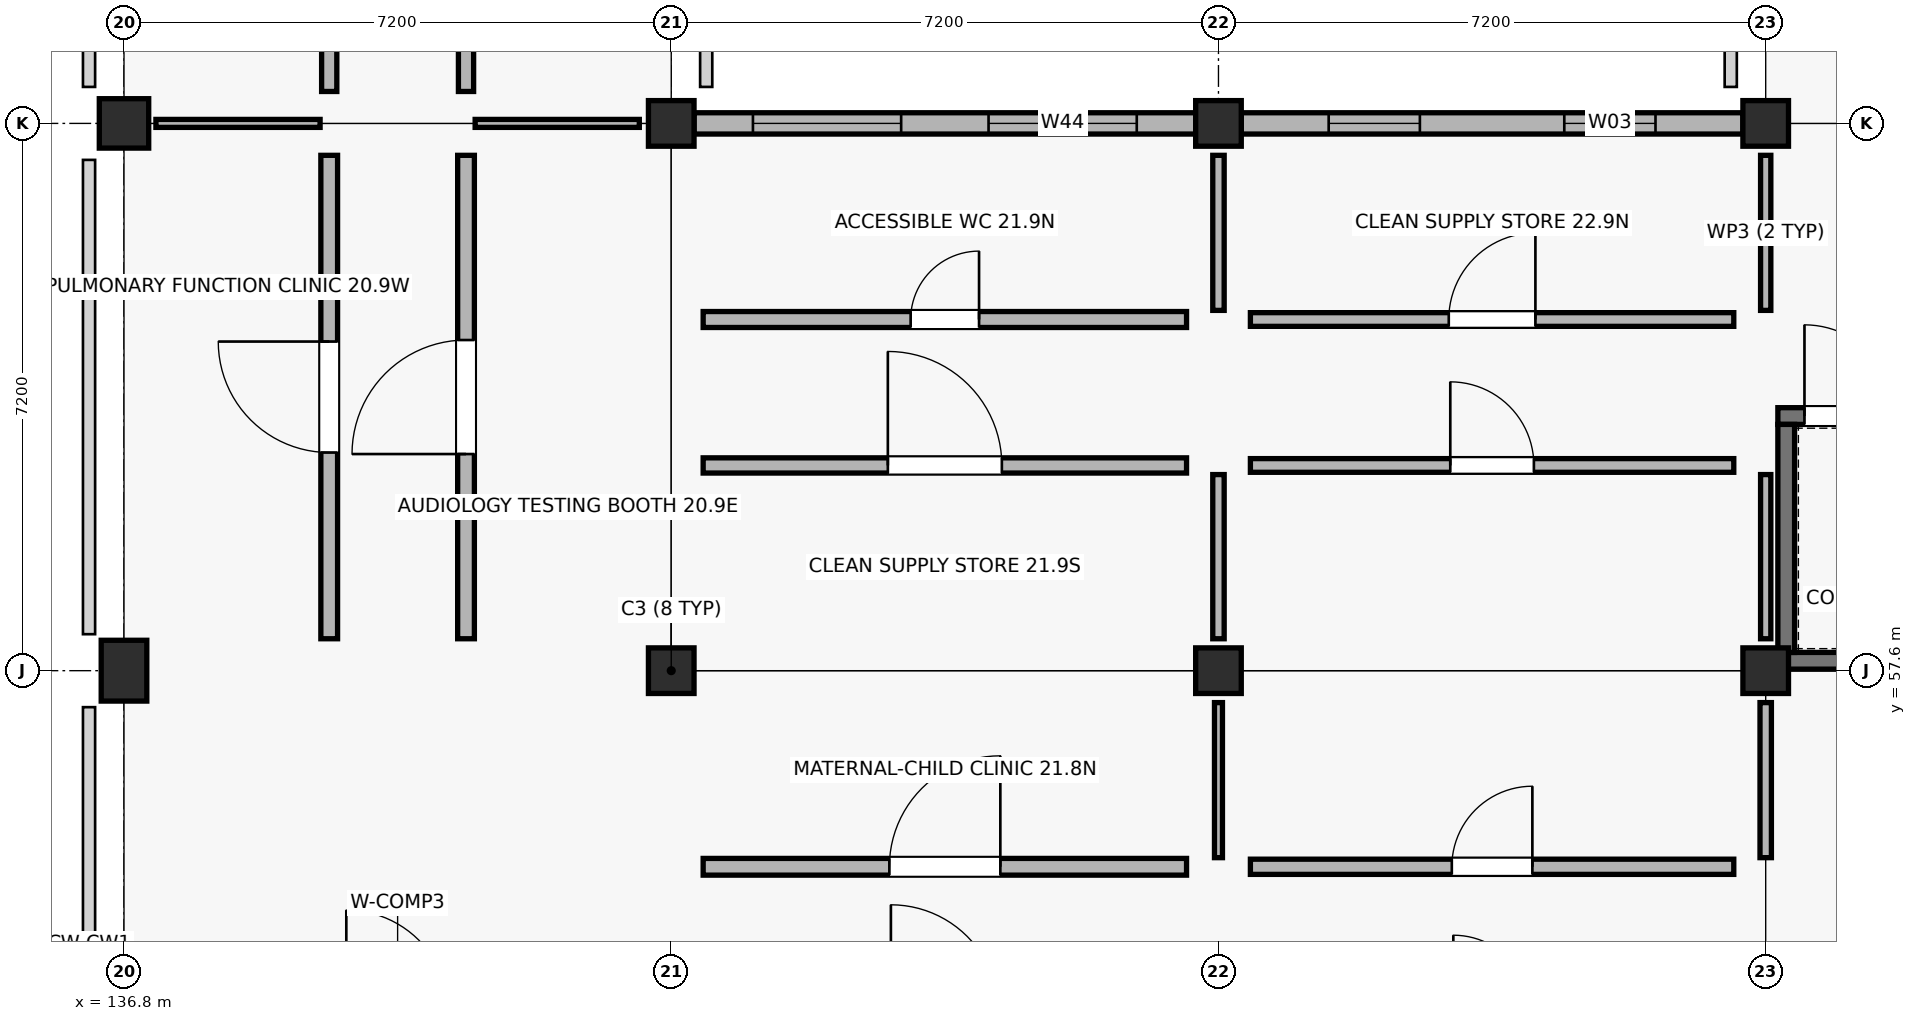
"""IFC4 building model, lengths in metres.
Left out: names, types, materials, properties, quantities, classifications, styles, units other than length and angle.
Written with IfcOpenShell. Run it as: python <this file> out.ifc"""

import sys

from ifc_helpers import new_model, si_unit, direction, frame, frame_2d, origin, origin_2d, place, context, subcontext, project, spatial, rectangle, circle, extrude, element, fill, save


model = new_model("IFC4")
c1 = context("Model", 3, precision=1e-05, world=origin(), true_north=direction((0.0, 1.0)))
c2 = subcontext(c1, "Body", "Model", "MODEL_VIEW")
j1 = project(units=[si_unit("LENGTHUNIT", "METRE"), si_unit("PLANEANGLEUNIT", "RADIAN")], contexts=[c1])
p1 = place(None, origin())
s1 = spatial("IfcSite", under=j1, at=p1, CompositionType="ELEMENT")
p2 = place(p1, origin())
s2 = spatial("IfcBuilding", under=s1, at=p2, CompositionType="ELEMENT")
p3 = place(p2, frame((0.0, 0.0, 4.5)))
s3 = spatial("IfcBuildingStorey", under=s2, at=p3, CompositionType="ELEMENT", Elevation=4.5)
p4 = place(p3, frame((136.8, 57.6, 0.0), z_axis=(0.0, 0.0, 1.0), x_axis=(1.0, 0.0, 0.0)))
e1 = element("IfcColumn", 1, at=p4, inside=s3, PredefinedType="PILASTER", context=c2, shape_type="SweptSolid", body=[
    extrude(rectangle(XDim=0.6, YDim=0.8, at=origin_2d()), origin(), (0.0, 0.0, 1.0), 4.5),
])
p5 = place(p3, frame((136.8, 64.8, 0.0), z_axis=(0.0, 0.0, 1.0), x_axis=(1.0, 0.0, 0.0)))
e2 = element("IfcColumn", 2, at=p5, inside=s3, PredefinedType="COLUMN", context=c2, shape_type="SweptSolid", body=[
    extrude(circle(Radius=0.325, at=origin_2d()), origin(), (0.0, 0.0, 1.0), 4.5),
])
for number, where, z_axis, x_axis in (
    (3, (144.0, 57.6, 0.0), (0.0, 0.0, 1.0), (1.0, 0.0, 0.0)),
    (4, (144.0, 64.8, 0.0), (0.0, 0.0, 1.0), (1.0, 0.0, 0.0)),
    (5, (151.2, 57.6, 0.0), (0.0, 0.0, 1.0), (1.0, 0.0, 0.0)),
    (6, (151.2, 64.8, 0.0), (0.0, 0.0, 1.0), (1.0, 0.0, 0.0)),
    (7, (158.4, 57.6, 0.0), (0.0, 0.0, 1.0), (1.0, 0.0, 0.0)),
    (8, (158.4, 64.8, 0.0), (0.0, 0.0, 1.0), (1.0, 0.0, 0.0)),
):
    element("IfcColumn", number, at=place(p3, frame(where, z_axis=z_axis, x_axis=x_axis)), inside=s3, PredefinedType="COLUMN", context=c2, shape_type="SweptSolid", body=[
        extrude(rectangle(XDim=0.6, YDim=0.6, at=origin_2d()), origin(), (0.0, 0.0, 1.0), 4.5),
    ])
p6 = place(p3, frame((150.9, 64.8, 0.0), z_axis=(0.0, 0.0, 1.0), x_axis=(-1.0, 0.0, 0.0)))
e9 = element("IfcWall", 9, at=p6, inside=s3, PredefinedType="STANDARD", context=c2, shape_type="SweptSolid", body=[
    extrude(rectangle(XDim=6.6, YDim=0.28, at=frame_2d((3.3, 0.0))), origin(), (0.0, 0.0, 1.0), 3.47),
])
p7 = place(p6, frame((0.775, 0.0, 0.9)))
e10 = element("IfcOpeningElement", 10, at=p7, cuts=e9, PredefinedType="OPENING", context=c2, shape_type="SweptSolid", body=[
    extrude(rectangle(XDim=1.95, YDim=1.75, at=frame_2d((0.975, 0.875))), frame((0.0, 0.15, 0.0), z_axis=(0.0, -1.0, 0.0), x_axis=(1.0, 0.0, 0.0)), (0.0, 0.0, 1.0), 0.3),
])
p8 = place(p6, frame((3.875, 0.0, 0.9)))
e11 = element("IfcOpeningElement", 11, at=p8, cuts=e9, PredefinedType="OPENING", context=c2, shape_type="SweptSolid", body=[
    extrude(rectangle(XDim=1.95, YDim=1.75, at=frame_2d((0.975, 0.875))), frame((0.0, 0.15, 0.0), z_axis=(0.0, -1.0, 0.0), x_axis=(1.0, 0.0, 0.0)), (0.0, 0.0, 1.0), 0.3),
])
p9 = place(p3, frame((158.1, 64.8, 0.0), z_axis=(0.0, 0.0, 1.0), x_axis=(-1.0, 0.0, 0.0)))
e12 = element("IfcWall", 12, at=p9, inside=s3, PredefinedType="STANDARD", context=c2, shape_type="SweptSolid", body=[
    extrude(rectangle(XDim=6.6, YDim=0.28, at=frame_2d((3.3, 0.0))), origin(), (0.0, 0.0, 1.0), 3.47),
])
p10 = place(p9, frame((1.15, 0.0, 0.9)))
e13 = element("IfcOpeningElement", 13, at=p10, cuts=e12, PredefinedType="OPENING", context=c2, shape_type="SweptSolid", body=[
    extrude(rectangle(XDim=1.2, YDim=1.25, at=frame_2d((0.6, 0.625))), frame((0.0, 0.15, 0.0), z_axis=(0.0, -1.0, 0.0), x_axis=(1.0, 0.0, 0.0)), (0.0, 0.0, 1.0), 0.3),
])
p11 = place(p9, frame((4.25, 0.0, 0.9)))
e14 = element("IfcOpeningElement", 14, at=p11, cuts=e12, PredefinedType="OPENING", context=c2, shape_type="SweptSolid", body=[
    extrude(rectangle(XDim=1.2, YDim=1.25, at=frame_2d((0.6, 0.625))), frame((0.0, 0.15, 0.0), z_axis=(0.0, -1.0, 0.0), x_axis=(1.0, 0.0, 0.0)), (0.0, 0.0, 1.0), 0.3),
])
p12 = place(p3, frame((158.56, 57.73, 0.0), z_axis=(0.0, 0.0, 1.0), x_axis=(1.0, 0.0, 0.0)))
e15 = element("IfcWall", 15, at=p12, inside=s3, PredefinedType="SHEAR", context=c2, shape_type="SweptSolid", body=[
    extrude(rectangle(XDim=6.88, YDim=0.22, at=frame_2d((3.44, 0.0))), origin(), (0.0, 0.0, 1.0), 4.22),
])
p13 = place(p3, frame((158.56, 60.95, 0.0), z_axis=(0.0, 0.0, 1.0), x_axis=(1.0, 0.0, 0.0)))
e16 = element("IfcWall", 16, at=p13, inside=s3, PredefinedType="SHEAR", context=c2, shape_type="SweptSolid", body=[
    extrude(rectangle(XDim=6.88, YDim=0.22, at=frame_2d((3.44, 0.0))), origin(), (0.0, 0.0, 1.0), 4.22),
])
p14 = place(p13, frame((0.35, 0.0, 0.0)))
e17 = element("IfcOpeningElement", 17, at=p14, cuts=e16, PredefinedType="OPENING", context=c2, shape_type="SweptSolid", body=[
    extrude(rectangle(XDim=1.2, YDim=2.15, at=frame_2d((0.6, 1.075))), frame((0.0, 0.12, 0.0), z_axis=(0.0, -1.0, 0.0), x_axis=(1.0, 0.0, 0.0)), (0.0, 0.0, 1.0), 0.24),
])
p15 = place(p3, frame((158.67, 57.84, 0.0), z_axis=(0.0, 0.0, 1.0), x_axis=(0.0, 1.0, 0.0)))
e18 = element("IfcWall", 18, at=p15, inside=s3, PredefinedType="SHEAR", context=c2, shape_type="SweptSolid", body=[
    extrude(rectangle(XDim=3.0, YDim=0.22, at=frame_2d((1.5, 0.0))), origin(), (0.0, 0.0, 1.0), 4.22),
])
p16 = place(p3, frame((139.5, 58.02, 0.0), z_axis=(0.0, 0.0, 1.0), x_axis=(0.0, 1.0, 0.0)))
e19 = element("IfcWall", 19, at=p16, inside=s3, PredefinedType="SOLIDWALL", context=c2, shape_type="SweptSolid", body=[
    extrude(rectangle(XDim=6.36, YDim=0.22, at=frame_2d((3.18, 0.0))), origin(), (0.0, 0.0, 1.0), 3.36),
])
p17 = place(p16, frame((2.45, 0.0, 0.0)))
e20 = element("IfcOpeningElement", 20, at=p17, cuts=e19, PredefinedType="OPENING", context=c2, shape_type="SweptSolid", body=[
    extrude(rectangle(XDim=1.46, YDim=2.09, at=frame_2d((0.73, 1.045))), frame((0.0, 0.12, 0.0), z_axis=(0.0, -1.0, 0.0), x_axis=(1.0, 0.0, 0.0)), (0.0, 0.0, 1.0), 0.24),
])
p18 = place(p3, frame((137.22, 64.8, 0.0), z_axis=(0.0, 0.0, 1.0), x_axis=(1.0, 0.0, 0.0)))
e21 = element("IfcWall", 21, at=p18, inside=s3, PredefinedType="PARTITIONING", context=c2, shape_type="SweptSolid", body=[
    extrude(rectangle(XDim=2.16, YDim=0.105, at=frame_2d((1.08, 0.0))), origin(), (0.0, 0.0, 1.0), 3.36),
])
p19 = place(p3, frame((141.3, 58.02, 0.0), z_axis=(0.0, 0.0, 1.0), x_axis=(0.0, 1.0, 0.0)))
e22 = element("IfcWall", 22, at=p19, inside=s3, PredefinedType="SOLIDWALL", context=c2, shape_type="SweptSolid", body=[
    extrude(rectangle(XDim=6.36, YDim=0.22, at=frame_2d((3.18, 0.0))), origin(), (0.0, 0.0, 1.0), 3.36),
])
p20 = place(p19, frame((2.43, 0.0, 0.0)))
e23 = element("IfcOpeningElement", 23, at=p20, cuts=e22, PredefinedType="OPENING", context=c2, shape_type="SweptSolid", body=[
    extrude(rectangle(XDim=1.5, YDim=2.09, at=frame_2d((0.75, 1.045))), frame((0.0, 0.12, 0.0), z_axis=(0.0, -1.0, 0.0), x_axis=(1.0, 0.0, 0.0)), (0.0, 0.0, 1.0), 0.24),
])
p21 = place(p3, frame((141.42, 64.8, 0.0), z_axis=(0.0, 0.0, 1.0), x_axis=(1.0, 0.0, 0.0)))
e24 = element("IfcWall", 24, at=p21, inside=s3, PredefinedType="PARTITIONING", context=c2, shape_type="SweptSolid", body=[
    extrude(rectangle(XDim=2.16, YDim=0.105, at=frame_2d((1.08, 0.0))), origin(), (0.0, 0.0, 1.0), 3.36),
])
p22 = place(p3, frame((139.5, 65.22, 0.0), z_axis=(0.0, 0.0, 1.0), x_axis=(0.0, 1.0, 0.0)))
e25 = element("IfcWall", 25, at=p22, inside=s3, PredefinedType="SOLIDWALL", context=c2, shape_type="SweptSolid", body=[
    extrude(rectangle(XDim=6.36, YDim=0.2, at=frame_2d((3.18, 0.0))), origin(), (0.0, 0.0, 1.0), 3.36),
])
p23 = place(p22, frame((2.73, 0.0, 0.0)))
e26 = element("IfcOpeningElement", 26, at=p23, cuts=e25, PredefinedType="OPENING", context=c2, shape_type="SweptSolid", body=[
    extrude(rectangle(XDim=0.9, YDim=2.14, at=frame_2d((0.45, 1.07))), frame((0.0, 0.11, 0.0), z_axis=(0.0, -1.0, 0.0), x_axis=(1.0, 0.0, 0.0)), (0.0, 0.0, 1.0), 0.22),
])
p24 = place(p3, frame((141.3, 65.22, 0.0), z_axis=(0.0, 0.0, 1.0), x_axis=(0.0, 1.0, 0.0)))
e27 = element("IfcWall", 27, at=p24, inside=s3, PredefinedType="SOLIDWALL", context=c2, shape_type="SweptSolid", body=[
    extrude(rectangle(XDim=6.36, YDim=0.2, at=frame_2d((3.18, 0.0))), origin(), (0.0, 0.0, 1.0), 3.36),
])
p25 = place(p24, frame((2.71, 0.0, 0.0)))
e28 = element("IfcOpeningElement", 28, at=p25, cuts=e27, PredefinedType="OPENING", context=c2, shape_type="SweptSolid", body=[
    extrude(rectangle(XDim=0.94, YDim=2.14, at=frame_2d((0.47, 1.07))), frame((0.0, 0.11, 0.0), z_axis=(0.0, -1.0, 0.0), x_axis=(1.0, 0.0, 0.0)), (0.0, 0.0, 1.0), 0.22),
])
p26 = place(p3, frame((144.42, 55.02, 0.0), z_axis=(0.0, 0.0, 1.0), x_axis=(1.0, 0.0, 0.0)))
e29 = element("IfcWall", 29, at=p26, inside=s3, PredefinedType="SOLIDWALL", context=c2, shape_type="SweptSolid", body=[
    extrude(rectangle(XDim=6.36, YDim=0.22, at=frame_2d((3.18, 0.0))), origin(), (0.0, 0.0, 1.0), 3.36),
])
p27 = place(p26, frame((2.45, 0.0, 0.0)))
e30 = element("IfcOpeningElement", 30, at=p27, cuts=e29, PredefinedType="OPENING", context=c2, shape_type="SweptSolid", body=[
    extrude(rectangle(XDim=1.46, YDim=2.14, at=frame_2d((0.73, 1.07))), frame((0.0, 0.12, 0.0), z_axis=(0.0, -1.0, 0.0), x_axis=(1.0, 0.0, 0.0)), (0.0, 0.0, 1.0), 0.24),
])
p28 = place(p3, frame((151.2, 55.14, 0.0), z_axis=(0.0, 0.0, 1.0), x_axis=(0.0, 1.0, 0.0)))
e31 = element("IfcWall", 31, at=p28, inside=s3, PredefinedType="PARTITIONING", context=c2, shape_type="SweptSolid", body=[
    extrude(rectangle(XDim=2.04, YDim=0.105, at=frame_2d((1.02, 0.0))), origin(), (0.0, 0.0, 1.0), 3.36),
])
p29 = place(p3, frame((144.42, 60.3, 0.0), z_axis=(0.0, 0.0, 1.0), x_axis=(1.0, 0.0, 0.0)))
e32 = element("IfcWall", 32, at=p29, inside=s3, PredefinedType="SOLIDWALL", context=c2, shape_type="SweptSolid", body=[
    extrude(rectangle(XDim=6.36, YDim=0.2, at=frame_2d((3.18, 0.0))), origin(), (0.0, 0.0, 1.0), 3.36),
])
p30 = place(p29, frame((2.43, 0.0, 0.0)))
e33 = element("IfcOpeningElement", 33, at=p30, cuts=e32, PredefinedType="OPENING", context=c2, shape_type="SweptSolid", body=[
    extrude(rectangle(XDim=1.5, YDim=2.14, at=frame_2d((0.75, 1.07))), frame((0.0, 0.11, 0.0), z_axis=(0.0, -1.0, 0.0), x_axis=(1.0, 0.0, 0.0)), (0.0, 0.0, 1.0), 0.22),
])
p31 = place(p3, frame((151.2, 58.02, 0.0), z_axis=(0.0, 0.0, 1.0), x_axis=(0.0, 1.0, 0.0)))
e34 = element("IfcWall", 34, at=p31, inside=s3, PredefinedType="PARTITIONING", context=c2, shape_type="SweptSolid", body=[
    extrude(rectangle(XDim=2.16, YDim=0.15, at=frame_2d((1.08, 0.0))), origin(), (0.0, 0.0, 1.0), 3.36),
])
p32 = place(p3, frame((144.42, 62.22, 0.0), z_axis=(0.0, 0.0, 1.0), x_axis=(1.0, 0.0, 0.0)))
e35 = element("IfcWall", 35, at=p32, inside=s3, PredefinedType="PLUMBINGWALL", context=c2, shape_type="SweptSolid", body=[
    extrude(rectangle(XDim=6.36, YDim=0.21, at=frame_2d((3.18, 0.0))), origin(), (0.0, 0.0, 1.0), 3.36),
])
p33 = place(p32, frame((2.73, 0.0, 0.0)))
e36 = element("IfcOpeningElement", 36, at=p33, cuts=e35, PredefinedType="OPENING", context=c2, shape_type="SweptSolid", body=[
    extrude(rectangle(XDim=0.9, YDim=2.19, at=frame_2d((0.45, 1.095))), frame((0.0, 0.115, 0.0), z_axis=(0.0, -1.0, 0.0), x_axis=(1.0, 0.0, 0.0)), (0.0, 0.0, 1.0), 0.23),
])
p34 = place(p3, frame((151.2, 62.34, 0.0), z_axis=(0.0, 0.0, 1.0), x_axis=(0.0, 1.0, 0.0)))
e37 = element("IfcWall", 37, at=p34, inside=s3, PredefinedType="PARTITIONING", context=c2, shape_type="SweptSolid", body=[
    extrude(rectangle(XDim=2.04, YDim=0.15, at=frame_2d((1.02, 0.0))), origin(), (0.0, 0.0, 1.0), 3.36),
])
p35 = place(p3, frame((151.62, 55.02, 0.0), z_axis=(0.0, 0.0, 1.0), x_axis=(1.0, 0.0, 0.0)))
e38 = element("IfcWall", 38, at=p35, inside=s3, PredefinedType="SOLIDWALL", context=c2, shape_type="SweptSolid", body=[
    extrude(rectangle(XDim=6.36, YDim=0.2, at=frame_2d((3.18, 0.0))), origin(), (0.0, 0.0, 1.0), 3.36),
])
p36 = place(p35, frame((2.65, 0.0, 0.0)))
e39 = element("IfcOpeningElement", 39, at=p36, cuts=e38, PredefinedType="OPENING", context=c2, shape_type="SweptSolid", body=[
    extrude(rectangle(XDim=1.06, YDim=2.19, at=frame_2d((0.53, 1.095))), frame((0.0, 0.11, 0.0), z_axis=(0.0, -1.0, 0.0), x_axis=(1.0, 0.0, 0.0)), (0.0, 0.0, 1.0), 0.22),
])
p37 = place(p3, frame((158.4, 55.14, 0.0), z_axis=(0.0, 0.0, 1.0), x_axis=(0.0, 1.0, 0.0)))
e40 = element("IfcWall", 40, at=p37, inside=s3, PredefinedType="PARTITIONING", context=c2, shape_type="SweptSolid", body=[
    extrude(rectangle(XDim=2.04, YDim=0.15, at=frame_2d((1.02, 0.0))), origin(), (0.0, 0.0, 1.0), 3.36),
])
p38 = place(p3, frame((151.62, 60.3, 0.0), z_axis=(0.0, 0.0, 1.0), x_axis=(1.0, 0.0, 0.0)))
e41 = element("IfcWall", 41, at=p38, inside=s3, PredefinedType="PARTITIONING", context=c2, shape_type="SweptSolid", body=[
    extrude(rectangle(XDim=6.36, YDim=0.18, at=frame_2d((3.18, 0.0))), origin(), (0.0, 0.0, 1.0), 3.36),
])
p39 = place(p38, frame((2.63, 0.0, 0.0)))
e42 = element("IfcOpeningElement", 42, at=p39, cuts=e41, PredefinedType="OPENING", context=c2, shape_type="SweptSolid", body=[
    extrude(rectangle(XDim=1.1, YDim=2.19, at=frame_2d((0.55, 1.095))), frame((0.0, 0.1, 0.0), z_axis=(0.0, -1.0, 0.0), x_axis=(1.0, 0.0, 0.0)), (0.0, 0.0, 1.0), 0.2),
])
p40 = place(p3, frame((158.4, 58.02, 0.0), z_axis=(0.0, 0.0, 1.0), x_axis=(0.0, 1.0, 0.0)))
e43 = element("IfcWall", 43, at=p40, inside=s3, PredefinedType="PARTITIONING", context=c2, shape_type="SweptSolid", body=[
    extrude(rectangle(XDim=2.16, YDim=0.135, at=frame_2d((1.08, 0.0))), origin(), (0.0, 0.0, 1.0), 3.36),
])
p41 = place(p3, frame((151.62, 62.22, 0.0), z_axis=(0.0, 0.0, 1.0), x_axis=(1.0, 0.0, 0.0)))
e44 = element("IfcWall", 44, at=p41, inside=s3, PredefinedType="PARTITIONING", context=c2, shape_type="SweptSolid", body=[
    extrude(rectangle(XDim=6.36, YDim=0.18, at=frame_2d((3.18, 0.0))), origin(), (0.0, 0.0, 1.0), 3.36),
])
p42 = place(p41, frame((2.61, 0.0, 0.0)))
e45 = element("IfcOpeningElement", 45, at=p42, cuts=e44, PredefinedType="OPENING", context=c2, shape_type="SweptSolid", body=[
    extrude(rectangle(XDim=1.14, YDim=2.19, at=frame_2d((0.57, 1.095))), frame((0.0, 0.1, 0.0), z_axis=(0.0, -1.0, 0.0), x_axis=(1.0, 0.0, 0.0)), (0.0, 0.0, 1.0), 0.2),
])
p43 = place(p3, frame((158.4, 62.34, 0.0), z_axis=(0.0, 0.0, 1.0), x_axis=(0.0, 1.0, 0.0)))
e46 = element("IfcWall", 46, at=p43, inside=s3, PredefinedType="PARTITIONING", context=c2, shape_type="SweptSolid", body=[
    extrude(rectangle(XDim=2.04, YDim=0.135, at=frame_2d((1.02, 0.0))), origin(), (0.0, 0.0, 1.0), 3.36),
])
p44 = place(p7, origin())
e47 = element("IfcWindow", 47, at=p44, inside=s3, PartitioningType="SINGLE_PANEL", PredefinedType="WINDOW", context=c2, shape_type="SweptSolid", body=[
    extrude(rectangle(XDim=1.95, YDim=1.75, at=frame_2d((0.975, 0.875))), frame((0.0, 0.03, 0.0), z_axis=(0.0, -1.0, 0.0), x_axis=(1.0, 0.0, 0.0)), (0.0, 0.0, 1.0), 0.06),
])
fill(e10, e47)
p45 = place(p8, origin())
e48 = element("IfcWindow", 48, at=p45, inside=s3, PartitioningType="SINGLE_PANEL", PredefinedType="WINDOW", context=c2, shape_type="SweptSolid", body=[
    extrude(rectangle(XDim=1.95, YDim=1.75, at=frame_2d((0.975, 0.875))), frame((0.0, 0.03, 0.0), z_axis=(0.0, -1.0, 0.0), x_axis=(1.0, 0.0, 0.0)), (0.0, 0.0, 1.0), 0.06),
])
fill(e11, e48)
p46 = place(p10, origin())
e49 = element("IfcWindow", 49, at=p46, inside=s3, PartitioningType="SINGLE_PANEL", PredefinedType="WINDOW", context=c2, shape_type="SweptSolid", body=[
    extrude(rectangle(XDim=1.2, YDim=1.25, at=frame_2d((0.6, 0.625))), frame((0.0, 0.03, 0.0), z_axis=(0.0, -1.0, 0.0), x_axis=(1.0, 0.0, 0.0)), (0.0, 0.0, 1.0), 0.06),
])
fill(e13, e49)
p47 = place(p11, origin())
e50 = element("IfcWindow", 50, at=p47, inside=s3, PartitioningType="SINGLE_PANEL", PredefinedType="WINDOW", context=c2, shape_type="SweptSolid", body=[
    extrude(rectangle(XDim=1.2, YDim=1.25, at=frame_2d((0.6, 0.625))), frame((0.0, 0.03, 0.0), z_axis=(0.0, -1.0, 0.0), x_axis=(1.0, 0.0, 0.0)), (0.0, 0.0, 1.0), 0.06),
])
fill(e14, e50)
p48 = place(p14, origin())
e51 = element("IfcDoor", 51, at=p48, inside=s3, OperationType="SINGLE_SWING_LEFT", PredefinedType="DOOR", context=c2, shape_type="SweptSolid", body=[
    extrude(rectangle(XDim=1.2, YDim=2.15, at=frame_2d((0.6, 1.075))), frame((0.0, 0.025, 0.0), z_axis=(0.0, -1.0, 0.0), x_axis=(1.0, 0.0, 0.0)), (0.0, 0.0, 1.0), 0.05),
])
fill(e17, e51)
p49 = place(p17, origin())
e52 = element("IfcDoor", 52, at=p49, inside=s3, OperationType="SINGLE_SWING_RIGHT", PredefinedType="DOOR", context=c2, shape_type="SweptSolid", body=[
    extrude(rectangle(XDim=1.46, YDim=2.09, at=frame_2d((0.73, 1.045))), frame((0.0, 0.025, 0.0), z_axis=(0.0, -1.0, 0.0), x_axis=(1.0, 0.0, 0.0)), (0.0, 0.0, 1.0), 0.05),
])
fill(e20, e52)
p50 = place(p20, origin())
e53 = element("IfcDoor", 53, at=p50, inside=s3, OperationType="SINGLE_SWING_LEFT", PredefinedType="DOOR", context=c2, shape_type="SweptSolid", body=[
    extrude(rectangle(XDim=1.5, YDim=2.09, at=frame_2d((0.75, 1.045))), frame((0.0, 0.025, 0.0), z_axis=(0.0, -1.0, 0.0), x_axis=(1.0, 0.0, 0.0)), (0.0, 0.0, 1.0), 0.05),
])
fill(e23, e53)
p51 = place(p27, origin())
e54 = element("IfcDoor", 54, at=p51, inside=s3, OperationType="SINGLE_SWING_RIGHT", PredefinedType="DOOR", context=c2, shape_type="SweptSolid", body=[
    extrude(rectangle(XDim=1.46, YDim=2.14, at=frame_2d((0.73, 1.07))), frame((0.0, 0.025, 0.0), z_axis=(0.0, -1.0, 0.0), x_axis=(1.0, 0.0, 0.0)), (0.0, 0.0, 1.0), 0.05),
])
fill(e30, e54)
p52 = place(p30, origin())
e55 = element("IfcDoor", 55, at=p52, inside=s3, OperationType="SINGLE_SWING_LEFT", PredefinedType="DOOR", context=c2, shape_type="SweptSolid", body=[
    extrude(rectangle(XDim=1.5, YDim=2.14, at=frame_2d((0.75, 1.07))), frame((0.0, 0.025, 0.0), z_axis=(0.0, -1.0, 0.0), x_axis=(1.0, 0.0, 0.0)), (0.0, 0.0, 1.0), 0.05),
])
fill(e33, e55)
p53 = place(p33, origin())
e56 = element("IfcDoor", 56, at=p53, inside=s3, OperationType="SINGLE_SWING_RIGHT", PredefinedType="DOOR", context=c2, shape_type="SweptSolid", body=[
    extrude(rectangle(XDim=0.9, YDim=2.19, at=frame_2d((0.45, 1.095))), frame((0.0, 0.025, 0.0), z_axis=(0.0, -1.0, 0.0), x_axis=(1.0, 0.0, 0.0)), (0.0, 0.0, 1.0), 0.05),
])
fill(e36, e56)
p54 = place(p36, origin())
e57 = element("IfcDoor", 57, at=p54, inside=s3, OperationType="SINGLE_SWING_RIGHT", PredefinedType="DOOR", context=c2, shape_type="SweptSolid", body=[
    extrude(rectangle(XDim=1.06, YDim=2.19, at=frame_2d((0.53, 1.095))), frame((0.0, 0.025, 0.0), z_axis=(0.0, -1.0, 0.0), x_axis=(1.0, 0.0, 0.0)), (0.0, 0.0, 1.0), 0.05),
])
fill(e39, e57)
p55 = place(p39, origin())
e58 = element("IfcDoor", 58, at=p55, inside=s3, OperationType="SINGLE_SWING_LEFT", PredefinedType="DOOR", context=c2, shape_type="SweptSolid", body=[
    extrude(rectangle(XDim=1.1, YDim=2.19, at=frame_2d((0.55, 1.095))), frame((0.0, 0.025, 0.0), z_axis=(0.0, -1.0, 0.0), x_axis=(1.0, 0.0, 0.0)), (0.0, 0.0, 1.0), 0.05),
])
fill(e42, e58)
p56 = place(p42, origin())
e59 = element("IfcDoor", 59, at=p56, inside=s3, OperationType="SINGLE_SWING_RIGHT", PredefinedType="DOOR", context=c2, shape_type="SweptSolid", body=[
    extrude(rectangle(XDim=1.14, YDim=2.19, at=frame_2d((0.57, 1.095))), frame((0.0, 0.025, 0.0), z_axis=(0.0, -1.0, 0.0), x_axis=(1.0, 0.0, 0.0)), (0.0, 0.0, 1.0), 0.05),
])
fill(e45, e59)
save(model, sys.argv[1])
